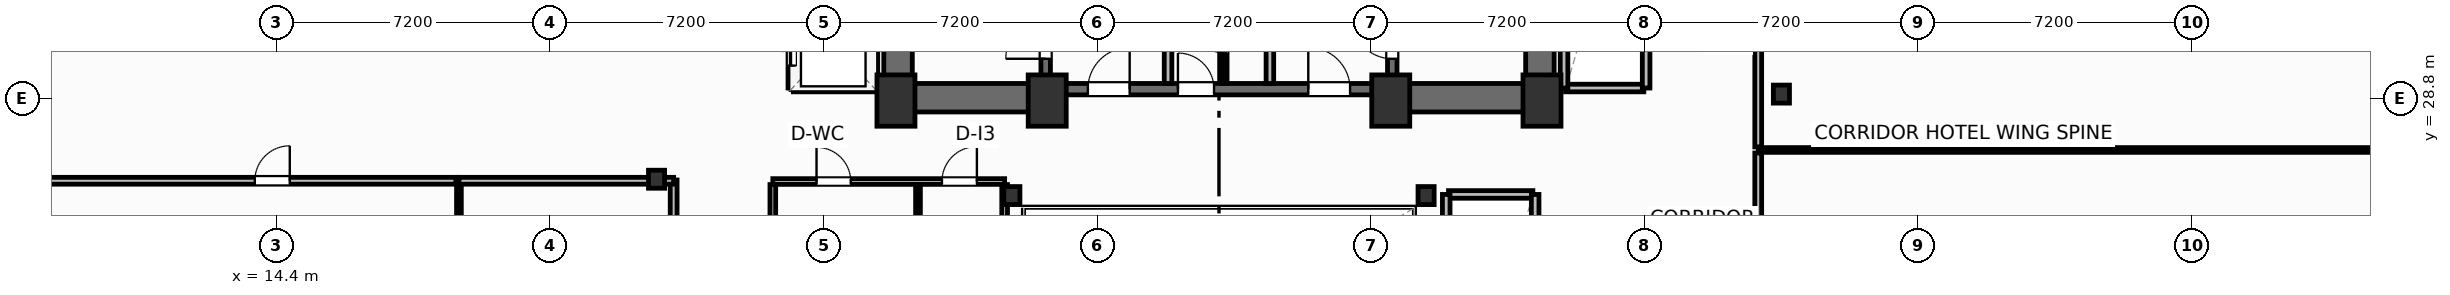
"""IFC4 building model, lengths in metres.
Left out: names, types, materials, properties, quantities, classifications, styles, units other than length and angle.
Written with IfcOpenShell. Run it as: python <this file> out.ifc"""

import sys

from ifc_helpers import new_model, si_unit, direction, frame, frame_2d, origin, origin_2d, place, context, subcontext, project, spatial, rectangle, i_section, extrude, element, fill, save


model = new_model("IFC4")
c1 = context("Model", 3, precision=1e-05, world=origin(), true_north=direction((0.0, 1.0)))
c2 = subcontext(c1, "Body", "Model", "MODEL_VIEW")
j1 = project(units=[si_unit("LENGTHUNIT", "METRE"), si_unit("PLANEANGLEUNIT", "RADIAN")], contexts=[c1])
p1 = place(None, origin())
s1 = spatial("IfcSite", under=j1, at=p1, CompositionType="ELEMENT")
p2 = place(p1, origin())
s2 = spatial("IfcBuilding", under=s1, at=p2, CompositionType="ELEMENT")
p3 = place(p2, frame((0.0, 0.0, 87.3)))
s3 = spatial("IfcBuildingStorey", under=s2, at=p3, CompositionType="ELEMENT", Elevation=87.3)
for number, where, z_axis, x_axis in (
    (1, (30.7, 28.75, 0.0), (0.0, 0.0, 1.0), (1.0, 0.0, 0.0)),
    (2, (34.68, 28.75, 0.0), (0.0, 0.0, 1.0), (1.0, 0.0, 0.0)),
    (3, (43.72, 28.75, 0.0), (0.0, 0.0, 1.0), (1.0, 0.0, 0.0)),
    (4, (47.7, 28.75, 0.0), (0.0, 0.0, 1.0), (1.0, 0.0, 0.0)),
):
    element("IfcColumn", number, at=place(p3, frame(where, z_axis=z_axis, x_axis=x_axis)), inside=s3, PredefinedType="COLUMN", context=c2, shape_type="SweptSolid", body=[
        extrude(rectangle(XDim=1.0, YDim=1.35, at=origin_2d()), origin(), (0.0, 0.0, 1.0), 3.7),
    ])
for number, where, z_axis, x_axis in (
    (5, (33.75, 26.25, 0.0), (0.0, 0.0, 1.0), (1.0, 0.0, 0.0)),
    (6, (44.65, 26.25, 0.0), (0.0, 0.0, 1.0), (1.0, 0.0, 0.0)),
    (7, (24.4, 26.68, 0.0), (0.0, 0.0, 1.0), (1.0, 0.0, 0.0)),
    (8, (54.0, 28.92, 0.0), (0.0, 0.0, 1.0), (1.0, 0.0, 0.0)),
):
    element("IfcColumn", number, at=place(p3, frame(where, z_axis=z_axis, x_axis=x_axis)), inside=s3, PredefinedType="COLUMN", context=c2, shape_type="SweptSolid", body=[
        extrude(i_section(OverallWidth=0.424, OverallDepth=0.474, WebThickness=0.048, FlangeThickness=0.077, FilletRadius=0.025, at=origin_2d()), origin(), (0.0, 0.0, 1.0), 3.7),
    ])
for number, where, z_axis, x_axis in (
    (9, (30.755, 29.2, 0.0), (0.0, 0.0, 1.0), (0.0, 1.0, 0.0)),
    (10, (47.645, 29.2, 0.0), (0.0, 0.0, 1.0), (0.0, 1.0, 0.0)),
):
    element("IfcWall", number, at=place(p3, frame(where, z_axis=z_axis, x_axis=x_axis)), inside=s3, PredefinedType="SHEAR", context=c2, shape_type="SweptSolid", body=[
        extrude(rectangle(XDim=9.22, YDim=0.75, at=frame_2d((4.61, 0.0))), origin(), (0.0, 0.0, 1.0), 3.45),
    ])
p4 = place(p3, frame((30.38, 28.825, 0.0), z_axis=(0.0, 0.0, 1.0), x_axis=(1.0, 0.0, 0.0)))
e11 = element("IfcWall", 11, at=p4, inside=s3, PredefinedType="SHEAR", context=c2, shape_type="SweptSolid", body=[
    extrude(rectangle(XDim=4.42, YDim=0.75, at=frame_2d((2.21, 0.0))), origin(), (0.0, 0.0, 1.0), 3.45),
])
p5 = place(p3, frame((43.6, 28.825, 0.0), z_axis=(0.0, 0.0, 1.0), x_axis=(1.0, 0.0, 0.0)))
e12 = element("IfcWall", 12, at=p5, inside=s3, PredefinedType="SHEAR", context=c2, shape_type="SweptSolid", body=[
    extrude(rectangle(XDim=4.42, YDim=0.75, at=frame_2d((2.21, 0.0))), origin(), (0.0, 0.0, 1.0), 3.45),
])
p6 = place(p3, frame((34.8, 29.05, 0.0), z_axis=(0.0, 0.0, 1.0), x_axis=(1.0, 0.0, 0.0)))
e13 = element("IfcWall", 13, at=p6, inside=s3, PredefinedType="SHEAR", context=c2, shape_type="SweptSolid", body=[
    extrude(rectangle(XDim=8.8, YDim=0.3, at=frame_2d((4.4, 0.0))), origin(), (0.0, 0.0, 1.0), 3.45),
])
p7 = place(p6, frame((0.95, 0.0, 0.0)))
e14 = element("IfcOpeningElement", 14, at=p7, cuts=e13, PredefinedType="OPENING", context=c2, shape_type="SweptSolid", body=[
    extrude(rectangle(XDim=1.1, YDim=2.15, at=frame_2d((0.55, 1.075))), frame((0.0, 0.16, 0.0), z_axis=(0.0, -1.0, 0.0), x_axis=(1.0, 0.0, 0.0)), (0.0, 0.0, 1.0), 0.32),
])
p8 = place(p6, frame((6.75, 0.0, 0.0)))
e15 = element("IfcOpeningElement", 15, at=p8, cuts=e13, PredefinedType="OPENING", context=c2, shape_type="SweptSolid", body=[
    extrude(rectangle(XDim=1.1, YDim=2.15, at=frame_2d((0.55, 1.075))), frame((0.0, 0.16, 0.0), z_axis=(0.0, -1.0, 0.0), x_axis=(1.0, 0.0, 0.0)), (0.0, 0.0, 1.0), 0.32),
])
p9 = place(p6, frame((3.32, 0.0, 0.0)))
e16 = element("IfcOpeningElement", 16, at=p9, cuts=e13, PredefinedType="OPENING", context=c2, shape_type="SweptSolid", body=[
    extrude(rectangle(XDim=0.95, YDim=2.15, at=frame_2d((0.475, 1.075))), frame((0.0, 0.16, 0.0), z_axis=(0.0, -1.0, 0.0), x_axis=(1.0, 0.0, 0.0)), (0.0, 0.0, 1.0), 0.32),
])
p10 = place(p3, frame((34.64, 29.2, 0.0), z_axis=(0.0, 0.0, 1.0), x_axis=(0.0, 1.0, 0.0)))
e17 = element("IfcWall", 17, at=p10, inside=s3, PredefinedType="SHEAR", context=c2, shape_type="SweptSolid", body=[
    extrude(rectangle(XDim=9.22, YDim=0.25, at=frame_2d((4.61, 0.0))), origin(), (0.0, 0.0, 1.0), 3.45),
])
p11 = place(p10, frame((0.65, 0.0, 0.0)))
e18 = element("IfcOpeningElement", 18, at=p11, cuts=e17, PredefinedType="OPENING", context=c2, shape_type="SweptSolid", body=[
    extrude(rectangle(XDim=1.05, YDim=2.15, at=frame_2d((0.525, 1.075))), frame((0.0, 0.135, 0.0), z_axis=(0.0, -1.0, 0.0), x_axis=(1.0, 0.0, 0.0)), (0.0, 0.0, 1.0), 0.27),
])
p12 = place(p3, frame((43.76, 29.2, 0.0), z_axis=(0.0, 0.0, 1.0), x_axis=(0.0, 1.0, 0.0)))
e19 = element("IfcWall", 19, at=p12, inside=s3, PredefinedType="SHEAR", context=c2, shape_type="SweptSolid", body=[
    extrude(rectangle(XDim=9.22, YDim=0.25, at=frame_2d((4.61, 0.0))), origin(), (0.0, 0.0, 1.0), 3.45),
])
p13 = place(p12, frame((0.65, 0.0, 0.0)))
e20 = element("IfcOpeningElement", 20, at=p13, cuts=e19, PredefinedType="OPENING", context=c2, shape_type="SweptSolid", body=[
    extrude(rectangle(XDim=1.05, YDim=2.15, at=frame_2d((0.525, 1.075))), frame((0.0, 0.135, 0.0), z_axis=(0.0, -1.0, 0.0), x_axis=(1.0, 0.0, 0.0)), (0.0, 0.0, 1.0), 0.27),
])
p14 = place(p3, frame((-0.094, 26.64, 0.0), z_axis=(0.0, 0.0, 1.0), x_axis=(1.0, 0.0, 0.0)))
e21 = element("IfcWall", 21, at=p14, inside=s3, PredefinedType="PARTITIONING", context=c2, shape_type="SweptSolid", body=[
    extrude(rectangle(XDim=19.214, YDim=0.18, at=frame_2d((9.607, 0.0))), origin(), (0.0, 0.0, 1.0), 3.45),
])
p15 = place(p14, frame((13.923, 0.0, 0.0)))
e22 = element("IfcOpeningElement", 22, at=p15, cuts=e21, PredefinedType="OPENING", context=c2, shape_type="SweptSolid", body=[
    extrude(rectangle(XDim=0.92, YDim=2.05, at=frame_2d((0.46, 1.025))), frame((0.0, 0.1, 0.0), z_axis=(0.0, -1.0, 0.0), x_axis=(1.0, 0.0, 0.0)), (0.0, 0.0, 1.0), 0.2),
])
p16 = place(p3, frame((24.85, 19.24, 0.0), z_axis=(0.0, 0.0, 1.0), x_axis=(0.0, 1.0, 0.0)))
e23 = element("IfcWall", 23, at=p16, inside=s3, PredefinedType="PARTITIONING", context=c2, shape_type="SweptSolid", body=[
    extrude(rectangle(XDim=7.42, YDim=0.18, at=frame_2d((3.71, 0.0))), origin(), (0.0, 0.0, 1.0), 3.45),
])
p17 = place(p16, frame((2.4, 0.0, 0.0)))
e24 = element("IfcOpeningElement", 24, at=p17, cuts=e23, PredefinedType="OPENING", context=c2, shape_type="SweptSolid", body=[
    extrude(rectangle(XDim=0.92, YDim=2.05, at=frame_2d((0.46, 1.025))), frame((0.0, 0.1, 0.0), z_axis=(0.0, -1.0, 0.0), x_axis=(1.0, 0.0, 0.0)), (0.0, 0.0, 1.0), 0.2),
])
p18 = place(p3, frame((19.2, 19.24, 0.0), z_axis=(0.0, 0.0, 1.0), x_axis=(0.0, 1.0, 0.0)))
e25 = element("IfcWall", 25, at=p18, inside=s3, PredefinedType="PARTITIONING", context=c2, shape_type="SweptSolid", body=[
    extrude(rectangle(XDim=7.42, YDim=0.125, at=frame_2d((3.71, 0.0))), origin(), (0.0, 0.0, 1.0), 3.45),
])
p19 = place(p3, frame((19.2, 26.64, 0.0), z_axis=(0.0, 0.0, 1.0), x_axis=(1.0, 0.0, 0.0)))
e26 = element("IfcWall", 26, at=p19, inside=s3, PredefinedType="PARTITIONING", context=c2, shape_type="SweptSolid", body=[
    extrude(rectangle(XDim=5.65, YDim=0.18, at=frame_2d((2.825, 0.0))), origin(), (0.0, 0.0, 1.0), 2.662),
])
p20 = place(p3, frame((53.39, 19.3, 0.0), z_axis=(0.0, 0.0, 1.0), x_axis=(0.0, 1.0, 0.0)))
e27 = element("IfcWall", 27, at=p20, inside=s3, PredefinedType="PARTITIONING", context=c2, shape_type="SweptSolid", body=[
    extrude(rectangle(XDim=8.07, YDim=0.18, at=frame_2d((4.035, 0.0))), origin(), (0.0, 0.0, 1.0), 3.45),
])
p21 = place(p20, frame((2.2, 0.0, 0.0)))
e28 = element("IfcOpeningElement", 28, at=p21, cuts=e27, PredefinedType="OPENING", context=c2, shape_type="SweptSolid", body=[
    extrude(rectangle(XDim=0.92, YDim=2.05, at=frame_2d((0.46, 1.025))), frame((0.0, 0.1, 0.0), z_axis=(0.0, -1.0, 0.0), x_axis=(1.0, 0.0, 0.0)), (0.0, 0.0, 1.0), 0.2),
])
p22 = place(p3, frame((53.39, 27.53, 0.0), z_axis=(0.0, 0.0, 1.0), x_axis=(0.0, 1.0, 0.0)))
e29 = element("IfcWall", 29, at=p22, inside=s3, PredefinedType="PARTITIONING", context=c2, shape_type="SweptSolid", body=[
    extrude(rectangle(XDim=11.67, YDim=0.18, at=frame_2d((5.835, 0.0))), origin(), (0.0, 0.0, 1.0), 3.45),
])
p23 = place(p22, frame((5.8, 0.0, 0.0)))
e30 = element("IfcOpeningElement", 30, at=p23, cuts=e29, PredefinedType="OPENING", context=c2, shape_type="SweptSolid", body=[
    extrude(rectangle(XDim=0.92, YDim=2.05, at=frame_2d((0.46, 1.025))), frame((0.0, 0.1, 0.0), z_axis=(0.0, -1.0, 0.0), x_axis=(1.0, 0.0, 0.0)), (0.0, 0.0, 1.0), 0.2),
])
p24 = place(p3, frame((53.39, 27.45, 0.0), z_axis=(0.0, 0.0, 1.0), x_axis=(1.0, 0.0, 0.0)))
e31 = element("IfcWall", 31, at=p24, inside=s3, PredefinedType="PARTITIONING", context=c2, shape_type="SweptSolid", body=[
    extrude(rectangle(XDim=23.61, YDim=0.125, at=frame_2d((11.805, 0.0))), origin(), (0.0, 0.0, 1.0), 3.45),
])
for number, where, z_axis, x_axis in (
    (32, (37.86, 29.2, 0.0), (0.0, 0.0, 1.0), (0.0, 1.0, 0.0)),
    (33, (40.54, 29.2, 0.0), (0.0, 0.0, 1.0), (0.0, 1.0, 0.0)),
):
    element("IfcWall", number, at=place(p3, frame(where, z_axis=z_axis, x_axis=x_axis)), inside=s3, PredefinedType="PARTITIONING", context=c2, shape_type="SweptSolid", body=[
        extrude(rectangle(XDim=5.18, YDim=0.2, at=frame_2d((2.59, 0.0))), origin(), (0.0, 0.0, 1.0), 3.45),
    ])
p25 = place(p3, frame((39.35, 29.2, 0.0), z_axis=(0.0, 0.0, 1.0), x_axis=(0.0, 1.0, 0.0)))
e34 = element("IfcWall", 34, at=p25, inside=s3, PredefinedType="PARTITIONING", context=c2, shape_type="SweptSolid", body=[
    extrude(rectangle(XDim=5.22, YDim=0.125, at=frame_2d((2.61, 0.0))), origin(), (0.0, 0.0, 1.0), 3.45),
])
p26 = place(p25, frame((0.8, 0.0, 0.0)))
e35 = element("IfcOpeningElement", 35, at=p26, cuts=e34, PredefinedType="OPENING", context=c2, shape_type="SweptSolid", body=[
    extrude(rectangle(XDim=0.85, YDim=2.05, at=frame_2d((0.425, 1.025))), frame((0.0, 0.073, 0.0), z_axis=(0.0, -1.0, 0.0), x_axis=(1.0, 0.0, 0.0)), (0.0, 0.0, 1.0), 0.145),
])
p27 = place(p25, frame((3.4, 0.0, 0.0)))
e36 = element("IfcOpeningElement", 36, at=p27, cuts=e34, PredefinedType="OPENING", context=c2, shape_type="SweptSolid", body=[
    extrude(rectangle(XDim=0.85, YDim=2.05, at=frame_2d((0.425, 1.025))), frame((0.0, 0.073, 0.0), z_axis=(0.0, -1.0, 0.0), x_axis=(1.0, 0.0, 0.0)), (0.0, 0.0, 1.0), 0.145),
])
p28 = place(p3, frame((27.46, 26.62, 0.0), z_axis=(0.0, 0.0, 1.0), x_axis=(1.0, 0.0, 0.0)))
e37 = element("IfcWall", 37, at=p28, inside=s3, PredefinedType="PARTITIONING", context=c2, shape_type="SweptSolid", body=[
    extrude(rectangle(XDim=6.1, YDim=0.15, at=frame_2d((3.05, 0.0))), origin(), (0.0, 0.0, 1.0), 2.662),
])
p29 = place(p28, frame((1.15, 0.0, 0.0)))
e38 = element("IfcOpeningElement", 38, at=p29, cuts=e37, PredefinedType="OPENING", context=c2, shape_type="SweptSolid", body=[
    extrude(rectangle(XDim=0.9, YDim=2.05, at=frame_2d((0.45, 1.025))), frame((0.0, 0.085, 0.0), z_axis=(0.0, -1.0, 0.0), x_axis=(1.0, 0.0, 0.0)), (0.0, 0.0, 1.0), 0.17),
])
p30 = place(p28, frame((4.45, 0.0, 0.0)))
e39 = element("IfcOpeningElement", 39, at=p30, cuts=e37, PredefinedType="OPENING", context=c2, shape_type="SweptSolid", body=[
    extrude(rectangle(XDim=0.92, YDim=2.05, at=frame_2d((0.46, 1.025))), frame((0.0, 0.085, 0.0), z_axis=(0.0, -1.0, 0.0), x_axis=(1.0, 0.0, 0.0)), (0.0, 0.0, 1.0), 0.17),
])
p31 = place(p3, frame((31.28, 19.38, 0.0), z_axis=(0.0, 0.0, 1.0), x_axis=(0.0, 1.0, 0.0)))
e40 = element("IfcWall", 40, at=p31, inside=s3, PredefinedType="PARTITIONING", context=c2, shape_type="SweptSolid", body=[
    extrude(rectangle(XDim=7.16, YDim=0.125, at=frame_2d((3.58, 0.0))), origin(), (0.0, 0.0, 1.0), 3.45),
])
p32 = place(p3, frame((27.46, 19.38, 0.0), z_axis=(0.0, 0.0, 1.0), x_axis=(0.0, 1.0, 0.0)))
e41 = element("IfcWall", 41, at=p32, inside=s3, PredefinedType="PARTITIONING", context=c2, shape_type="SweptSolid", body=[
    extrude(rectangle(XDim=7.16, YDim=0.15, at=frame_2d((3.58, 0.0))), origin(), (0.0, 0.0, 1.0), 3.45),
])
p33 = place(p32, frame((1.4, 0.0, 0.0)))
e42 = element("IfcOpeningElement", 42, at=p33, cuts=e41, PredefinedType="OPENING", context=c2, shape_type="SweptSolid", body=[
    extrude(rectangle(XDim=0.95, YDim=2.05, at=frame_2d((0.475, 1.025))), frame((0.0, 0.085, 0.0), z_axis=(0.0, -1.0, 0.0), x_axis=(1.0, 0.0, 0.0)), (0.0, 0.0, 1.0), 0.17),
])
p34 = place(p3, frame((33.56, 19.38, 0.0), z_axis=(0.0, 0.0, 1.0), x_axis=(0.0, 1.0, 0.0)))
e43 = element("IfcWall", 43, at=p34, inside=s3, PredefinedType="PARTITIONING", context=c2, shape_type="SweptSolid", body=[
    extrude(rectangle(XDim=7.16, YDim=0.15, at=frame_2d((3.58, 0.0))), origin(), (0.0, 0.0, 1.0), 2.824),
])
p35 = place(p3, frame((28.0, 29.08, 0.0), z_axis=(0.0, 0.0, 1.0), x_axis=(1.0, 0.0, 0.0)))
e44 = element("IfcWall", 44, at=p35, inside=s3, PredefinedType="PARTITIONING", context=c2, shape_type="SweptSolid", body=[
    extrude(rectangle(XDim=2.1, YDim=0.2, at=frame_2d((1.05, 0.0))), origin(), (0.0, 0.0, 1.0), 3.45),
])
p36 = place(p3, frame((30.12, 29.08, 0.0), z_axis=(0.0, 0.0, 1.0), x_axis=(0.0, 1.0, 0.0)))
e45 = element("IfcWall", 45, at=p36, inside=s3, PredefinedType="PARTITIONING", context=c2, shape_type="SweptSolid", body=[
    extrude(rectangle(XDim=6.89, YDim=0.2, at=frame_2d((3.445, 0.0))), origin(), (0.0, 0.0, 1.0), 3.45),
])
p37 = place(p3, frame((27.96, 29.08, 0.0), z_axis=(0.0, 0.0, 1.0), x_axis=(0.0, 1.0, 0.0)))
e46 = element("IfcWall", 46, at=p37, inside=s3, PredefinedType="PARTITIONING", context=c2, shape_type="SweptSolid", body=[
    extrude(rectangle(XDim=6.89, YDim=0.2, at=frame_2d((3.445, 0.0))), origin(), (0.0, 0.0, 1.0), 3.45),
])
p38 = place(p37, frame((0.59, 0.0, 0.0)))
e47 = element("IfcOpeningElement", 47, at=p38, cuts=e46, PredefinedType="OPENING", context=c2, shape_type="SweptSolid", body=[
    extrude(rectangle(XDim=1.1, YDim=2.15, at=frame_2d((0.55, 1.075))), frame((0.0, 0.11, 0.0), z_axis=(0.0, -1.0, 0.0), x_axis=(1.0, 0.0, 0.0)), (0.0, 0.0, 1.0), 0.22),
])
p39 = place(p37, frame((2.89, 0.0, 0.0)))
e48 = element("IfcOpeningElement", 48, at=p39, cuts=e46, PredefinedType="OPENING", context=c2, shape_type="SweptSolid", body=[
    extrude(rectangle(XDim=1.1, YDim=2.15, at=frame_2d((0.55, 1.075))), frame((0.0, 0.11, 0.0), z_axis=(0.0, -1.0, 0.0), x_axis=(1.0, 0.0, 0.0)), (0.0, 0.0, 1.0), 0.22),
])
p40 = place(p37, frame((5.19, 0.0, 0.0)))
e49 = element("IfcOpeningElement", 49, at=p40, cuts=e46, PredefinedType="OPENING", context=c2, shape_type="SweptSolid", body=[
    extrude(rectangle(XDim=1.1, YDim=2.15, at=frame_2d((0.55, 1.075))), frame((0.0, 0.11, 0.0), z_axis=(0.0, -1.0, 0.0), x_axis=(1.0, 0.0, 0.0)), (0.0, 0.0, 1.0), 0.22),
])
p41 = place(p3, frame((48.32, 29.08, 0.0), z_axis=(0.0, 0.0, 1.0), x_axis=(1.0, 0.0, 0.0)))
e50 = element("IfcWall", 50, at=p41, inside=s3, PredefinedType="PARTITIONING", context=c2, shape_type="SweptSolid", body=[
    extrude(rectangle(XDim=2.06, YDim=0.2, at=frame_2d((1.03, 0.0))), origin(), (0.0, 0.0, 1.0), 2.662),
])
for number, where, z_axis, x_axis in (
    (51, (48.28, 29.08, 0.0), (0.0, 0.0, 1.0), (0.0, 1.0, 0.0)),
    (52, (50.44, 29.08, 0.0), (0.0, 0.0, 1.0), (0.0, 1.0, 0.0)),
):
    element("IfcWall", number, at=place(p3, frame(where, z_axis=z_axis, x_axis=x_axis)), inside=s3, PredefinedType="PARTITIONING", context=c2, shape_type="SweptSolid", body=[
        extrude(rectangle(XDim=6.89, YDim=0.2, at=frame_2d((3.445, 0.0))), origin(), (0.0, 0.0, 1.0), 3.45),
    ])
p42 = place(p3, frame((45.24, 26.28, 0.0), z_axis=(0.0, 0.0, 1.0), x_axis=(1.0, 0.0, 0.0)))
e53 = element("IfcWall", 53, at=p42, inside=s3, PredefinedType="PARTITIONING", context=c2, shape_type="SweptSolid", body=[
    extrude(rectangle(XDim=2.22, YDim=0.2, at=frame_2d((1.11, 0.0))), origin(), (0.0, 0.0, 1.0), 3.45),
])
for number, where, z_axis, x_axis in (
    (54, (45.18, 19.38, 0.0), (0.0, 0.0, 1.0), (0.0, 1.0, 0.0)),
    (55, (47.52, 19.38, 0.0), (0.0, 0.0, 1.0), (0.0, 1.0, 0.0)),
):
    element("IfcWall", number, at=place(p3, frame(where, z_axis=z_axis, x_axis=x_axis)), inside=s3, PredefinedType="PARTITIONING", context=c2, shape_type="SweptSolid", body=[
        extrude(rectangle(XDim=6.9, YDim=0.2, at=frame_2d((3.45, 0.0))), origin(), (0.0, 0.0, 1.0), 3.45),
    ])
p43 = place(p15, origin())
e56 = element("IfcDoor", 56, at=p43, inside=s3, OperationType="SINGLE_SWING_RIGHT", PredefinedType="DOOR", context=c2, shape_type="SweptSolid", body=[
    extrude(rectangle(XDim=0.92, YDim=2.05, at=frame_2d((0.46, 1.025))), frame((0.0, 0.025, 0.0), z_axis=(0.0, -1.0, 0.0), x_axis=(1.0, 0.0, 0.0)), (0.0, 0.0, 1.0), 0.05),
])
fill(e22, e56)
p44 = place(p11, origin())
e57 = element("IfcDoor", 57, at=p44, inside=s3, OperationType="SINGLE_SWING_LEFT", PredefinedType="DOOR", context=c2, shape_type="SweptSolid", body=[
    extrude(rectangle(XDim=1.05, YDim=2.15, at=frame_2d((0.525, 1.075))), frame((0.0, 0.025, 0.0), z_axis=(0.0, -1.0, 0.0), x_axis=(1.0, 0.0, 0.0)), (0.0, 0.0, 1.0), 0.05),
])
fill(e18, e57)
p45 = place(p13, origin())
e58 = element("IfcDoor", 58, at=p45, inside=s3, OperationType="SINGLE_SWING_RIGHT", PredefinedType="DOOR", context=c2, shape_type="SweptSolid", body=[
    extrude(rectangle(XDim=1.05, YDim=2.15, at=frame_2d((0.525, 1.075))), frame((0.0, 0.025, 0.0), z_axis=(0.0, -1.0, 0.0), x_axis=(1.0, 0.0, 0.0)), (0.0, 0.0, 1.0), 0.05),
])
fill(e20, e58)
p46 = place(p7, origin())
e59 = element("IfcDoor", 59, at=p46, inside=s3, OperationType="SINGLE_SWING_RIGHT", PredefinedType="DOOR", context=c2, shape_type="SweptSolid", body=[
    extrude(rectangle(XDim=1.1, YDim=2.15, at=frame_2d((0.55, 1.075))), frame((0.0, 0.025, 0.0), z_axis=(0.0, -1.0, 0.0), x_axis=(1.0, 0.0, 0.0)), (0.0, 0.0, 1.0), 0.05),
])
fill(e14, e59)
p47 = place(p8, origin())
e60 = element("IfcDoor", 60, at=p47, inside=s3, OperationType="SINGLE_SWING_LEFT", PredefinedType="DOOR", context=c2, shape_type="SweptSolid", body=[
    extrude(rectangle(XDim=1.1, YDim=2.15, at=frame_2d((0.55, 1.075))), frame((0.0, 0.025, 0.0), z_axis=(0.0, -1.0, 0.0), x_axis=(1.0, 0.0, 0.0)), (0.0, 0.0, 1.0), 0.05),
])
fill(e15, e60)
p48 = place(p26, origin())
e61 = element("IfcDoor", 61, at=p48, inside=s3, OperationType="SINGLE_SWING_RIGHT", PredefinedType="DOOR", context=c2, shape_type="SweptSolid", body=[
    extrude(rectangle(XDim=0.85, YDim=2.05, at=frame_2d((0.425, 1.025))), frame((0.0, 0.025, 0.0), z_axis=(0.0, -1.0, 0.0), x_axis=(1.0, 0.0, 0.0)), (0.0, 0.0, 1.0), 0.05),
])
fill(e35, e61)
p49 = place(p9, origin())
e62 = element("IfcDoor", 62, at=p49, inside=s3, OperationType="SINGLE_SWING_LEFT", PredefinedType="DOOR", context=c2, shape_type="SweptSolid", body=[
    extrude(rectangle(XDim=0.95, YDim=2.15, at=frame_2d((0.475, 1.075))), frame((0.0, 0.025, 0.0), z_axis=(0.0, -1.0, 0.0), x_axis=(1.0, 0.0, 0.0)), (0.0, 0.0, 1.0), 0.05),
])
fill(e16, e62)
p50 = place(p29, origin())
e63 = element("IfcDoor", 63, at=p50, inside=s3, OperationType="SINGLE_SWING_LEFT", PredefinedType="DOOR", context=c2, shape_type="SweptSolid", body=[
    extrude(rectangle(XDim=0.9, YDim=2.05, at=frame_2d((0.45, 1.025))), frame((0.0, 0.025, 0.0), z_axis=(0.0, -1.0, 0.0), x_axis=(1.0, 0.0, 0.0)), (0.0, 0.0, 1.0), 0.05),
])
fill(e38, e63)
p51 = place(p30, origin())
e64 = element("IfcDoor", 64, at=p51, inside=s3, OperationType="SINGLE_SWING_RIGHT", PredefinedType="DOOR", context=c2, shape_type="SweptSolid", body=[
    extrude(rectangle(XDim=0.92, YDim=2.05, at=frame_2d((0.46, 1.025))), frame((0.0, 0.025, 0.0), z_axis=(0.0, -1.0, 0.0), x_axis=(1.0, 0.0, 0.0)), (0.0, 0.0, 1.0), 0.05),
])
fill(e39, e64)
p52 = place(p38, origin())
e65 = element("IfcDoor", 65, at=p52, inside=s3, OperationType="SLIDING_TO_LEFT", PredefinedType="DOOR", context=c2, shape_type="SweptSolid", body=[
    extrude(rectangle(XDim=1.1, YDim=2.15, at=frame_2d((0.55, 1.075))), frame((0.0, 0.025, 0.0), z_axis=(0.0, -1.0, 0.0), x_axis=(1.0, 0.0, 0.0)), (0.0, 0.0, 1.0), 0.05),
])
fill(e47, e65)
save(model, sys.argv[1])
